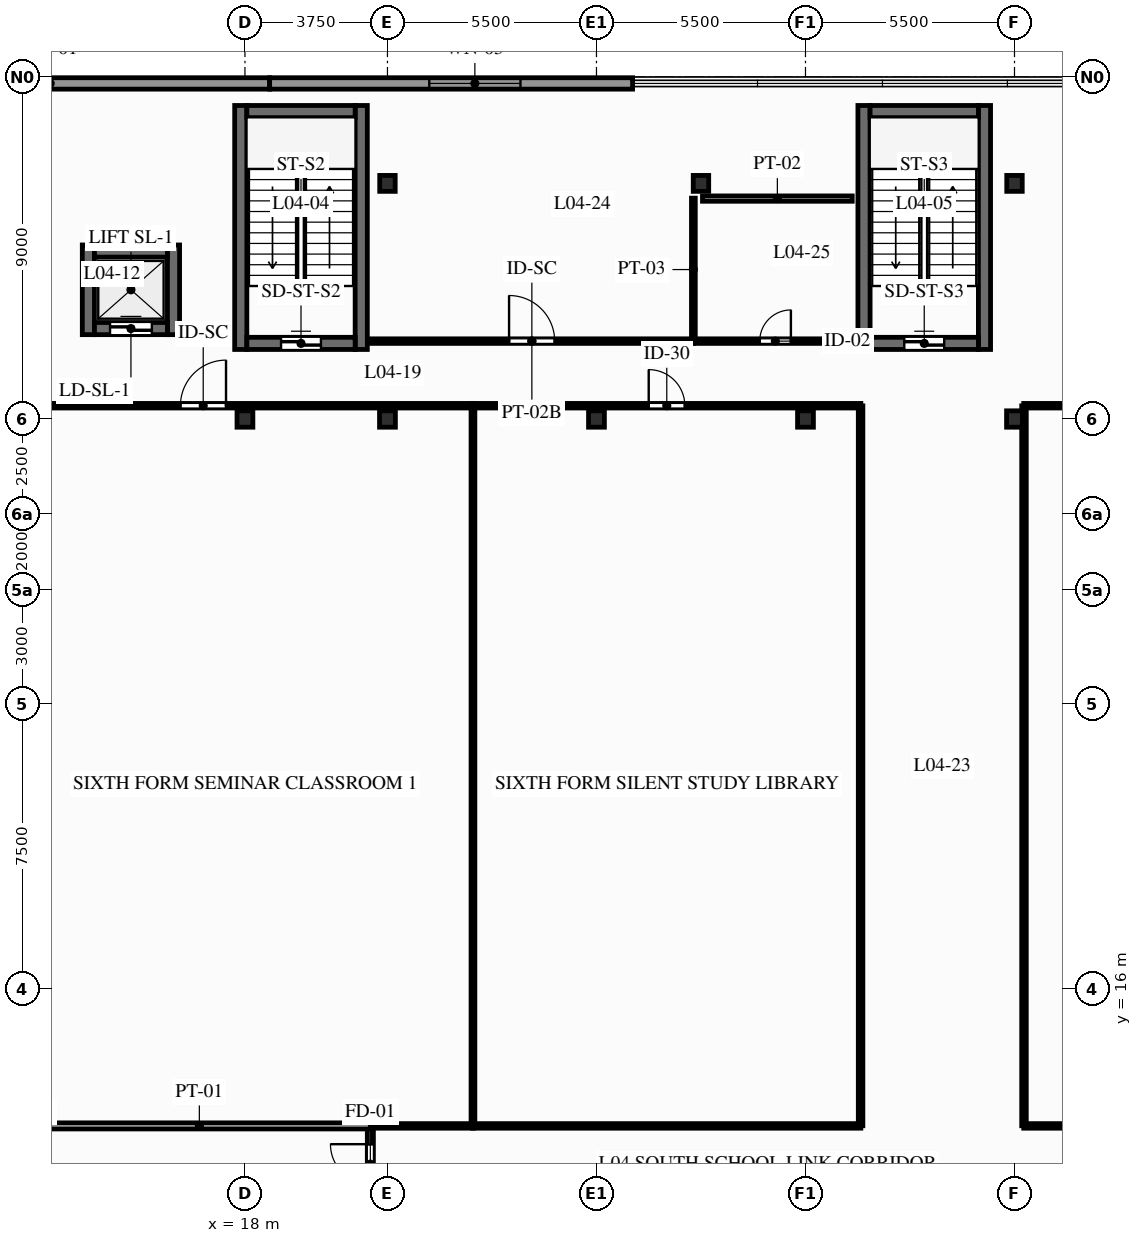
"""IFC4 building model, lengths in metres.
Left out: names, types, materials, properties, quantities, classifications, styles, units other than length and angle.
Written with IfcOpenShell. Run it as: python <this file> out.ifc"""

import sys

from ifc_helpers import new_model, si_unit, direction, frame, frame_2d, origin, origin_2d, place, context, subcontext, project, spatial, rectangle, i_section, extrude, element, fill, save


model = new_model("IFC4")
c1 = context("Model", 3, precision=1e-05, world=origin(), true_north=direction((0.0, 1.0)))
c2 = subcontext(c1, "Body", "Model", "MODEL_VIEW")
j1 = project(units=[si_unit("LENGTHUNIT", "METRE"), si_unit("PLANEANGLEUNIT", "RADIAN")], contexts=[c1])
p1 = place(None, origin())
s1 = spatial("IfcSite", under=j1, at=p1, CompositionType="ELEMENT")
p2 = place(p1, origin())
s2 = spatial("IfcBuilding", under=s1, at=p2, CompositionType="ELEMENT")
p3 = place(p2, frame((0.0, 0.0, 18.0)))
s3 = spatial("IfcBuildingStorey", under=s2, at=p3, CompositionType="ELEMENT", Elevation=18.0)
for number, where, z_axis, x_axis in (
    (1, (18.0, 31.0, 0.0), (0.0, 0.0, 1.0), (1.0, 0.0, 0.0)),
    (2, (21.75, 31.0, 0.0), (0.0, 0.0, 1.0), (1.0, 0.0, 0.0)),
):
    element("IfcColumn", number, at=place(p3, frame(where, z_axis=z_axis, x_axis=x_axis)), inside=s3, PredefinedType="COLUMN", context=c2, shape_type="SweptSolid", body=[
        extrude(i_section(OverallWidth=0.417, OverallDepth=0.431, WebThickness=0.065, FlangeThickness=0.106, FilletRadius=0.015, at=origin_2d()), origin(), (0.0, 0.0, 1.0), 4.5),
    ])
p4 = place(p3, frame((21.75, 37.2, 0.0), z_axis=(0.0, 0.0, 1.0), x_axis=(1.0, 0.0, 0.0)))
e3 = element("IfcColumn", 3, at=p4, inside=s3, PredefinedType="COLUMN", context=c2, shape_type="SweptSolid", body=[
    extrude(i_section(OverallWidth=0.407, OverallDepth=0.419, WebThickness=0.031, FlangeThickness=0.049, FilletRadius=0.015, at=origin_2d()), origin(), (0.0, 0.0, 1.0), 4.5),
])
p5 = place(p3, frame((27.25, 31.0, 0.0), z_axis=(0.0, 0.0, 1.0), x_axis=(1.0, 0.0, 0.0)))
e4 = element("IfcColumn", 4, at=p5, inside=s3, PredefinedType="COLUMN", context=c2, shape_type="SweptSolid", body=[
    extrude(i_section(OverallWidth=0.417, OverallDepth=0.431, WebThickness=0.065, FlangeThickness=0.106, FilletRadius=0.015, at=origin_2d()), origin(), (0.0, 0.0, 1.0), 4.5),
])
p6 = place(p3, frame((30.0, 37.2, 0.0), z_axis=(0.0, 0.0, 1.0), x_axis=(1.0, 0.0, 0.0)))
e5 = element("IfcColumn", 5, at=p6, inside=s3, PredefinedType="COLUMN", context=c2, shape_type="SweptSolid", body=[
    extrude(i_section(OverallWidth=0.407, OverallDepth=0.419, WebThickness=0.031, FlangeThickness=0.049, FilletRadius=0.015, at=origin_2d()), origin(), (0.0, 0.0, 1.0), 4.5),
])
for number, where, z_axis, x_axis in (
    (6, (32.75, 31.0, 0.0), (0.0, 0.0, 1.0), (1.0, 0.0, 0.0)),
    (7, (38.25, 31.0, 0.0), (0.0, 0.0, 1.0), (1.0, 0.0, 0.0)),
):
    element("IfcColumn", number, at=place(p3, frame(where, z_axis=z_axis, x_axis=x_axis)), inside=s3, PredefinedType="COLUMN", context=c2, shape_type="SweptSolid", body=[
        extrude(i_section(OverallWidth=0.417, OverallDepth=0.431, WebThickness=0.065, FlangeThickness=0.106, FilletRadius=0.015, at=origin_2d()), origin(), (0.0, 0.0, 1.0), 4.5),
    ])
p7 = place(p3, frame((38.25, 37.2, 0.0), z_axis=(0.0, 0.0, 1.0), x_axis=(1.0, 0.0, 0.0)))
e8 = element("IfcColumn", 8, at=p7, inside=s3, PredefinedType="COLUMN", context=c2, shape_type="SweptSolid", body=[
    extrude(i_section(OverallWidth=0.407, OverallDepth=0.419, WebThickness=0.031, FlangeThickness=0.049, FilletRadius=0.015, at=origin_2d()), origin(), (0.0, 0.0, 1.0), 4.5),
])
p8 = place(p3, frame((7.1, 39.83, 0.0), z_axis=(0.0, 0.0, 1.0), x_axis=(1.0, 0.0, 0.0)))
e9 = element("IfcWall", 9, at=p8, inside=s3, PredefinedType="STANDARD", context=c2, shape_type="SweptSolid", body=[
    extrude(rectangle(XDim=11.55, YDim=0.3, at=frame_2d((5.775, 0.0))), origin(), (0.0, 0.0, 1.0), 4.22),
])
p9 = place(p3, frame((18.65, 39.83, 0.0), z_axis=(0.0, 0.0, 1.0), x_axis=(1.0, 0.0, 0.0)))
e10 = element("IfcWall", 10, at=p9, inside=s3, PredefinedType="STANDARD", context=c2, shape_type="SweptSolid", body=[
    extrude(rectangle(XDim=9.55, YDim=0.3, at=frame_2d((4.775, 0.0))), origin(), (0.0, 0.0, 1.0), 4.22),
])
p10 = place(p9, frame((4.2, 0.0, 0.9)))
e11 = element("IfcOpeningElement", 11, at=p10, cuts=e10, PredefinedType="OPENING", context=c2, shape_type="SweptSolid", body=[
    extrude(rectangle(XDim=2.4, YDim=2.15, at=frame_2d((1.2, 1.075))), frame((0.0, 0.16, 0.0), z_axis=(0.0, -1.0, 0.0), x_axis=(1.0, 0.0, 0.0)), (0.0, 0.0, 1.0), 0.32),
])
for number, where, z_axis, x_axis in (
    (12, (17.89, 32.83, 0.0), (0.0, 0.0, 1.0), (0.0, 1.0, 0.0)),
    (13, (21.06, 32.83, 0.0), (0.0, 0.0, 1.0), (0.0, 1.0, 0.0)),
):
    element("IfcWall", number, at=place(p3, frame(where, z_axis=z_axis, x_axis=x_axis)), inside=s3, PredefinedType="SHEAR", context=c2, shape_type="SweptSolid", body=[
        extrude(rectangle(XDim=6.42, YDim=0.32, at=frame_2d((3.21, 0.0))), origin(), (0.0, 0.0, 1.0), 4.22),
    ])
p11 = place(p3, frame((18.05, 32.99, 0.0), z_axis=(0.0, 0.0, 1.0), x_axis=(1.0, 0.0, 0.0)))
e14 = element("IfcWall", 14, at=p11, inside=s3, PredefinedType="SHEAR", context=c2, shape_type="SweptSolid", body=[
    extrude(rectangle(XDim=2.85, YDim=0.32, at=frame_2d((1.425, 0.0))), origin(), (0.0, 0.0, 1.0), 4.22),
])
p12 = place(p11, frame((0.9, 0.0, 0.0)))
e15 = element("IfcOpeningElement", 15, at=p12, cuts=e14, PredefinedType="OPENING", context=c2, shape_type="SweptSolid", body=[
    extrude(rectangle(XDim=1.05, YDim=2.06, at=frame_2d((0.525, 1.03))), frame((0.0, 0.17, 0.0), z_axis=(0.0, -1.0, 0.0), x_axis=(1.0, 0.0, 0.0)), (0.0, 0.0, 1.0), 0.34),
])
p13 = place(p3, frame((20.9, 39.09, 0.0), z_axis=(0.0, 0.0, 1.0), x_axis=(-1.0, 0.0, 0.0)))
e16 = element("IfcWall", 16, at=p13, inside=s3, PredefinedType="SHEAR", context=c2, shape_type="SweptSolid", body=[
    extrude(rectangle(XDim=2.85, YDim=0.32, at=frame_2d((1.425, 0.0))), origin(), (0.0, 0.0, 1.0), 4.22),
])
for number, where, z_axis, x_axis in (
    (17, (34.29, 32.83, 0.0), (0.0, 0.0, 1.0), (0.0, 1.0, 0.0)),
    (18, (37.46, 32.83, 0.0), (0.0, 0.0, 1.0), (0.0, 1.0, 0.0)),
):
    element("IfcWall", number, at=place(p3, frame(where, z_axis=z_axis, x_axis=x_axis)), inside=s3, PredefinedType="SHEAR", context=c2, shape_type="SweptSolid", body=[
        extrude(rectangle(XDim=6.42, YDim=0.32, at=frame_2d((3.21, 0.0))), origin(), (0.0, 0.0, 1.0), 4.22),
    ])
p14 = place(p3, frame((34.45, 32.99, 0.0), z_axis=(0.0, 0.0, 1.0), x_axis=(1.0, 0.0, 0.0)))
e19 = element("IfcWall", 19, at=p14, inside=s3, PredefinedType="SHEAR", context=c2, shape_type="SweptSolid", body=[
    extrude(rectangle(XDim=2.85, YDim=0.32, at=frame_2d((1.425, 0.0))), origin(), (0.0, 0.0, 1.0), 4.22),
])
p15 = place(p14, frame((0.9, 0.0, 0.0)))
e20 = element("IfcOpeningElement", 20, at=p15, cuts=e19, PredefinedType="OPENING", context=c2, shape_type="SweptSolid", body=[
    extrude(rectangle(XDim=1.05, YDim=2.06, at=frame_2d((0.525, 1.03))), frame((0.0, 0.17, 0.0), z_axis=(0.0, -1.0, 0.0), x_axis=(1.0, 0.0, 0.0)), (0.0, 0.0, 1.0), 0.34),
])
p16 = place(p3, frame((37.3, 39.09, 0.0), z_axis=(0.0, 0.0, 1.0), x_axis=(-1.0, 0.0, 0.0)))
e21 = element("IfcWall", 21, at=p16, inside=s3, PredefinedType="SHEAR", context=c2, shape_type="SweptSolid", body=[
    extrude(rectangle(XDim=2.85, YDim=0.32, at=frame_2d((1.425, 0.0))), origin(), (0.0, 0.0, 1.0), 4.22),
])
for number, where, z_axis, x_axis in (
    (22, (13.88, 33.22, 0.0), (0.0, 0.0, 1.0), (0.0, 1.0, 0.0)),
    (23, (16.12, 33.22, 0.0), (0.0, 0.0, 1.0), (0.0, 1.0, 0.0)),
):
    element("IfcWall", number, at=place(p3, frame(where, z_axis=z_axis, x_axis=x_axis)), inside=s3, PredefinedType="SHEAR", context=c2, shape_type="SweptSolid", body=[
        extrude(rectangle(XDim=2.36, YDim=0.32, at=frame_2d((1.18, 0.0))), origin(), (0.0, 0.0, 1.0), 4.22),
    ])
p17 = place(p3, frame((14.04, 33.38, 0.0), z_axis=(0.0, 0.0, 1.0), x_axis=(1.0, 0.0, 0.0)))
e24 = element("IfcWall", 24, at=p17, inside=s3, PredefinedType="SHEAR", context=c2, shape_type="SweptSolid", body=[
    extrude(rectangle(XDim=1.92, YDim=0.32, at=frame_2d((0.96, 0.0))), origin(), (0.0, 0.0, 1.0), 4.22),
])
p18 = place(p17, frame((0.41, 0.0, 0.0)))
e25 = element("IfcOpeningElement", 25, at=p18, cuts=e24, PredefinedType="OPENING", context=c2, shape_type="SweptSolid", body=[
    extrude(rectangle(XDim=1.1, YDim=2.06, at=frame_2d((0.55, 1.03))), frame((0.0, 0.17, 0.0), z_axis=(0.0, -1.0, 0.0), x_axis=(1.0, 0.0, 0.0)), (0.0, 0.0, 1.0), 0.34),
])
p19 = place(p3, frame((14.04, 35.42, 0.0), z_axis=(0.0, 0.0, 1.0), x_axis=(1.0, 0.0, 0.0)))
e26 = element("IfcWall", 26, at=p19, inside=s3, PredefinedType="SHEAR", context=c2, shape_type="SweptSolid", body=[
    extrude(rectangle(XDim=1.92, YDim=0.32, at=frame_2d((0.96, 0.0))), origin(), (0.0, 0.0, 1.0), 4.22),
])
p20 = place(p3, frame((21.3, 10.389, 0.0), z_axis=(0.0, 0.0, 1.0), x_axis=(0.0, 1.0, 0.0)))
e27 = element("IfcWall", 27, at=p20, inside=s3, PredefinedType="PARTITIONING", context=c2, shape_type="SweptSolid", body=[
    extrude(rectangle(XDim=2.011, YDim=0.16, at=frame_2d((1.006, 0.0))), origin(), (0.0, 0.0, 1.0), 4.22),
])
p21 = place(p20, frame((0.481, 0.0, 0.0)))
e28 = element("IfcOpeningElement", 28, at=p21, cuts=e27, PredefinedType="OPENING", context=c2, shape_type="SweptSolid", body=[
    extrude(rectangle(XDim=1.05, YDim=2.06, at=frame_2d((0.525, 1.03))), frame((0.0, 0.09, 0.0), z_axis=(0.0, -1.0, 0.0), x_axis=(1.0, 0.0, 0.0)), (0.0, 0.0, 1.0), 0.18),
])
p22 = place(p3, frame((12.3, 12.4, 0.0), z_axis=(0.0, 0.0, 1.0), x_axis=(1.0, 0.0, 0.0)))
e29 = element("IfcWall", 29, at=p22, inside=s3, PredefinedType="PARTITIONING", context=c2, shape_type="SweptSolid", body=[
    extrude(rectangle(XDim=9.0, YDim=0.16, at=frame_2d((4.5, 0.0))), origin(), (0.0, 0.0, 1.0), 3.344),
])
p23 = place(p3, frame((21.289, 33.05, 0.0), z_axis=(0.0, 0.0, 1.0), x_axis=(1.0, 0.0, 0.0)))
e30 = element("IfcWall", 30, at=p23, inside=s3, PredefinedType="PARTITIONING", context=c2, shape_type="SweptSolid", body=[
    extrude(rectangle(XDim=8.522, YDim=0.12, at=frame_2d((4.261, 0.0))), origin(), (0.0, 0.0, 1.0), 3.344),
])
p24 = place(p23, frame((3.661, 0.0, 0.0)))
e31 = element("IfcOpeningElement", 31, at=p24, cuts=e30, PredefinedType="OPENING", context=c2, shape_type="SweptSolid", body=[
    extrude(rectangle(XDim=1.2, YDim=2.08, at=frame_2d((0.6, 1.04))), frame((0.0, 0.07, 0.0), z_axis=(0.0, -1.0, 0.0), x_axis=(1.0, 0.0, 0.0)), (0.0, 0.0, 1.0), 0.14),
])
p25 = place(p3, frame((29.793, 33.05, 0.0), z_axis=(0.0, 0.0, 1.0), x_axis=(1.0, 0.0, 0.0)))
e32 = element("IfcWall", 32, at=p25, inside=s3, PredefinedType="PARTITIONING", context=c2, shape_type="SweptSolid", body=[
    extrude(rectangle(XDim=4.327, YDim=0.12, at=frame_2d((2.164, 0.0))), origin(), (0.0, 0.0, 1.0), 4.22),
])
p26 = place(p25, frame((1.754, 0.0, 0.0)))
e33 = element("IfcOpeningElement", 33, at=p26, cuts=e32, PredefinedType="OPENING", context=c2, shape_type="SweptSolid", body=[
    extrude(rectangle(XDim=0.82, YDim=2.02, at=frame_2d((0.41, 1.01))), frame((0.0, 0.07, 0.0), z_axis=(0.0, -1.0, 0.0), x_axis=(1.0, 0.0, 0.0)), (0.0, 0.0, 1.0), 0.14),
])
p27 = place(p3, frame((11.993, 31.35, 0.0), z_axis=(0.0, 0.0, 1.0), x_axis=(1.0, 0.0, 0.0)))
e34 = element("IfcWall", 34, at=p27, inside=s3, PredefinedType="PARTITIONING", context=c2, shape_type="SweptSolid", body=[
    extrude(rectangle(XDim=12.019, YDim=0.12, at=frame_2d((6.009, 0.0))), origin(), (0.0, 0.0, 1.0), 3.344),
])
p28 = place(p27, frame((4.309, 0.0, 0.0)))
e35 = element("IfcOpeningElement", 35, at=p28, cuts=e34, PredefinedType="OPENING", context=c2, shape_type="SweptSolid", body=[
    extrude(rectangle(XDim=1.2, YDim=2.08, at=frame_2d((0.6, 1.04))), frame((0.0, 0.07, 0.0), z_axis=(0.0, -1.0, 0.0), x_axis=(1.0, 0.0, 0.0)), (0.0, 0.0, 1.0), 0.14),
])
p29 = place(p3, frame((23.993, 31.35, 0.0), z_axis=(0.0, 0.0, 1.0), x_axis=(1.0, 0.0, 0.0)))
e36 = element("IfcWall", 36, at=p29, inside=s3, PredefinedType="PARTITIONING", context=c2, shape_type="SweptSolid", body=[
    extrude(rectangle(XDim=10.215, YDim=0.12, at=frame_2d((5.107, 0.0))), origin(), (0.0, 0.0, 1.0), 4.22),
])
p30 = place(p29, frame((4.632, 0.0, 0.0)))
e37 = element("IfcOpeningElement", 37, at=p30, cuts=e36, PredefinedType="OPENING", context=c2, shape_type="SweptSolid", body=[
    extrude(rectangle(XDim=0.95, YDim=2.05, at=frame_2d((0.475, 1.025))), frame((0.0, 0.07, 0.0), z_axis=(0.0, -1.0, 0.0), x_axis=(1.0, 0.0, 0.0)), (0.0, 0.0, 1.0), 0.14),
])
p31 = place(p3, frame((38.493, 31.35, 0.0), z_axis=(0.0, 0.0, 1.0), x_axis=(1.0, 0.0, 0.0)))
e38 = element("IfcWall", 38, at=p31, inside=s3, PredefinedType="PARTITIONING", context=c2, shape_type="SweptSolid", body=[
    extrude(rectangle(XDim=11.519, YDim=0.12, at=frame_2d((5.759, 0.0))), origin(), (0.0, 0.0, 1.0), 3.344),
])
p32 = place(p31, frame((5.159, 0.0, 0.0)))
e39 = element("IfcOpeningElement", 39, at=p32, cuts=e38, PredefinedType="OPENING", context=c2, shape_type="SweptSolid", body=[
    extrude(rectangle(XDim=1.2, YDim=2.08, at=frame_2d((0.6, 1.04))), frame((0.0, 0.07, 0.0), z_axis=(0.0, -1.0, 0.0), x_axis=(1.0, 0.0, 0.0)), (0.0, 0.0, 1.0), 0.14),
])
p33 = place(p3, frame((21.304, 12.4, 0.0), z_axis=(0.0, 0.0, 1.0), x_axis=(1.0, 0.0, 0.0)))
e40 = element("IfcWall", 40, at=p33, inside=s3, PredefinedType="PARTITIONING", context=c2, shape_type="SweptSolid", body=[
    extrude(rectangle(XDim=2.707, YDim=0.12, at=frame_2d((1.354, 0.0))), origin(), (0.0, 0.0, 1.0), 3.344),
])
p34 = place(p3, frame((23.993, 12.4, 0.0), z_axis=(0.0, 0.0, 1.0), x_axis=(1.0, 0.0, 0.0)))
e41 = element("IfcWall", 41, at=p34, inside=s3, PredefinedType="PARTITIONING", context=c2, shape_type="SweptSolid", body=[
    extrude(rectangle(XDim=10.215, YDim=0.12, at=frame_2d((5.107, 0.0))), origin(), (0.0, 0.0, 1.0), 3.344),
])
p35 = place(p3, frame((38.493, 12.4, 0.0), z_axis=(0.0, 0.0, 1.0), x_axis=(1.0, 0.0, 0.0)))
e42 = element("IfcWall", 42, at=p35, inside=s3, PredefinedType="PARTITIONING", context=c2, shape_type="SweptSolid", body=[
    extrude(rectangle(XDim=3.703, YDim=0.12, at=frame_2d((1.852, 0.0))), origin(), (0.0, 0.0, 1.0), 3.344),
])
p36 = place(p3, frame((34.2, 12.404, 0.0), z_axis=(0.0, 0.0, 1.0), x_axis=(0.0, 1.0, 0.0)))
e43 = element("IfcWall", 43, at=p36, inside=s3, PredefinedType="PARTITIONING", context=c2, shape_type="SweptSolid", body=[
    extrude(rectangle(XDim=18.942, YDim=0.12, at=frame_2d((9.471, 0.0))), origin(), (0.0, 0.0, 1.0), 3.583),
])
p37 = place(p3, frame((38.5, 12.404, 0.0), z_axis=(0.0, 0.0, 1.0), x_axis=(0.0, 1.0, 0.0)))
e44 = element("IfcWall", 44, at=p37, inside=s3, PredefinedType="PARTITIONING", context=c2, shape_type="SweptSolid", body=[
    extrude(rectangle(XDim=18.942, YDim=0.12, at=frame_2d((9.471, 0.0))), origin(), (0.0, 0.0, 1.0), 3.344),
])
p38 = place(p3, frame((29.8, 33.054, 0.0), z_axis=(0.0, 0.0, 1.0), x_axis=(0.0, 1.0, 0.0)))
e45 = element("IfcWall", 45, at=p38, inside=s3, PredefinedType="PARTITIONING", context=c2, shape_type="SweptSolid", body=[
    extrude(rectangle(XDim=3.757, YDim=0.1, at=frame_2d((1.879, 0.0))), origin(), (0.0, 0.0, 1.0), 3.738),
])
p39 = place(p3, frame((24.0, 12.404, 0.0), z_axis=(0.0, 0.0, 1.0), x_axis=(0.0, 1.0, 0.0)))
e46 = element("IfcWall", 46, at=p39, inside=s3, PredefinedType="PARTITIONING", context=c2, shape_type="SweptSolid", body=[
    extrude(rectangle(XDim=18.942, YDim=0.1, at=frame_2d((9.471, 0.0))), origin(), (0.0, 0.0, 1.0), 3.583),
])
p40 = place(p3, frame((30.04, 36.8, 0.0), z_axis=(0.0, 0.0, 1.0), x_axis=(1.0, 0.0, 0.0)))
e47 = element("IfcWall", 47, at=p40, inside=s3, PredefinedType="PARTITIONING", context=c2, shape_type="SweptSolid", body=[
    extrude(rectangle(XDim=3.94, YDim=0.14, at=frame_2d((1.97, 0.0))), origin(), (0.0, 0.0, 1.0), 4.22),
])
p41 = place(p10, origin())
e48 = element("IfcWindow", 48, at=p41, inside=s3, PartitioningType="SINGLE_PANEL", PredefinedType="WINDOW", context=c2, shape_type="SweptSolid", body=[
    extrude(rectangle(XDim=2.4, YDim=2.15, at=frame_2d((1.2, 1.075))), frame((0.0, 0.03, 0.0), z_axis=(0.0, -1.0, 0.0), x_axis=(1.0, 0.0, 0.0)), (0.0, 0.0, 1.0), 0.06),
])
fill(e11, e48)
p42 = place(p12, origin())
e49 = element("IfcDoor", 49, at=p42, inside=s3, OperationType="SINGLE_SWING_LEFT", PredefinedType="DOOR", context=c2, shape_type="SweptSolid", body=[
    extrude(rectangle(XDim=1.05, YDim=2.06, at=frame_2d((0.525, 1.03))), frame((0.0, 0.025, 0.0), z_axis=(0.0, -1.0, 0.0), x_axis=(1.0, 0.0, 0.0)), (0.0, 0.0, 1.0), 0.05),
])
fill(e15, e49)
p43 = place(p15, origin())
e50 = element("IfcDoor", 50, at=p43, inside=s3, OperationType="SINGLE_SWING_LEFT", PredefinedType="DOOR", context=c2, shape_type="SweptSolid", body=[
    extrude(rectangle(XDim=1.05, YDim=2.06, at=frame_2d((0.525, 1.03))), frame((0.0, 0.025, 0.0), z_axis=(0.0, -1.0, 0.0), x_axis=(1.0, 0.0, 0.0)), (0.0, 0.0, 1.0), 0.05),
])
fill(e20, e50)
p44 = place(p18, origin())
e51 = element("IfcDoor", 51, at=p44, inside=s3, OperationType="SLIDING_TO_RIGHT", PredefinedType="DOOR", context=c2, shape_type="SweptSolid", body=[
    extrude(rectangle(XDim=1.1, YDim=2.06, at=frame_2d((0.55, 1.03))), frame((0.0, 0.025, 0.0), z_axis=(0.0, -1.0, 0.0), x_axis=(1.0, 0.0, 0.0)), (0.0, 0.0, 1.0), 0.05),
])
fill(e25, e51)
p45 = place(p21, origin())
e52 = element("IfcDoor", 52, at=p45, inside=s3, OperationType="SINGLE_SWING_RIGHT", PredefinedType="DOOR", context=c2, shape_type="SweptSolid", body=[
    extrude(rectangle(XDim=1.05, YDim=2.06, at=frame_2d((0.525, 1.03))), frame((0.0, 0.025, 0.0), z_axis=(0.0, -1.0, 0.0), x_axis=(1.0, 0.0, 0.0)), (0.0, 0.0, 1.0), 0.05),
])
fill(e28, e52)
p46 = place(p24, origin())
e53 = element("IfcDoor", 53, at=p46, inside=s3, OperationType="SINGLE_SWING_LEFT", PredefinedType="DOOR", context=c2, shape_type="SweptSolid", body=[
    extrude(rectangle(XDim=1.2, YDim=2.08, at=frame_2d((0.6, 1.04))), frame((0.0, 0.025, 0.0), z_axis=(0.0, -1.0, 0.0), x_axis=(1.0, 0.0, 0.0)), (0.0, 0.0, 1.0), 0.05),
])
fill(e31, e53)
p47 = place(p26, origin())
e54 = element("IfcDoor", 54, at=p47, inside=s3, OperationType="SINGLE_SWING_RIGHT", PredefinedType="DOOR", context=c2, shape_type="SweptSolid", body=[
    extrude(rectangle(XDim=0.82, YDim=2.02, at=frame_2d((0.41, 1.01))), frame((0.0, 0.025, 0.0), z_axis=(0.0, -1.0, 0.0), x_axis=(1.0, 0.0, 0.0)), (0.0, 0.0, 1.0), 0.05),
])
fill(e33, e54)
p48 = place(p28, origin())
e55 = element("IfcDoor", 55, at=p48, inside=s3, OperationType="SINGLE_SWING_RIGHT", PredefinedType="DOOR", context=c2, shape_type="SweptSolid", body=[
    extrude(rectangle(XDim=1.2, YDim=2.08, at=frame_2d((0.6, 1.04))), frame((0.0, 0.025, 0.0), z_axis=(0.0, -1.0, 0.0), x_axis=(1.0, 0.0, 0.0)), (0.0, 0.0, 1.0), 0.05),
])
fill(e35, e55)
p49 = place(p30, origin())
e56 = element("IfcDoor", 56, at=p49, inside=s3, OperationType="SINGLE_SWING_LEFT", PredefinedType="DOOR", context=c2, shape_type="SweptSolid", body=[
    extrude(rectangle(XDim=0.95, YDim=2.05, at=frame_2d((0.475, 1.025))), frame((0.0, 0.025, 0.0), z_axis=(0.0, -1.0, 0.0), x_axis=(1.0, 0.0, 0.0)), (0.0, 0.0, 1.0), 0.05),
])
fill(e37, e56)
save(model, sys.argv[1])
